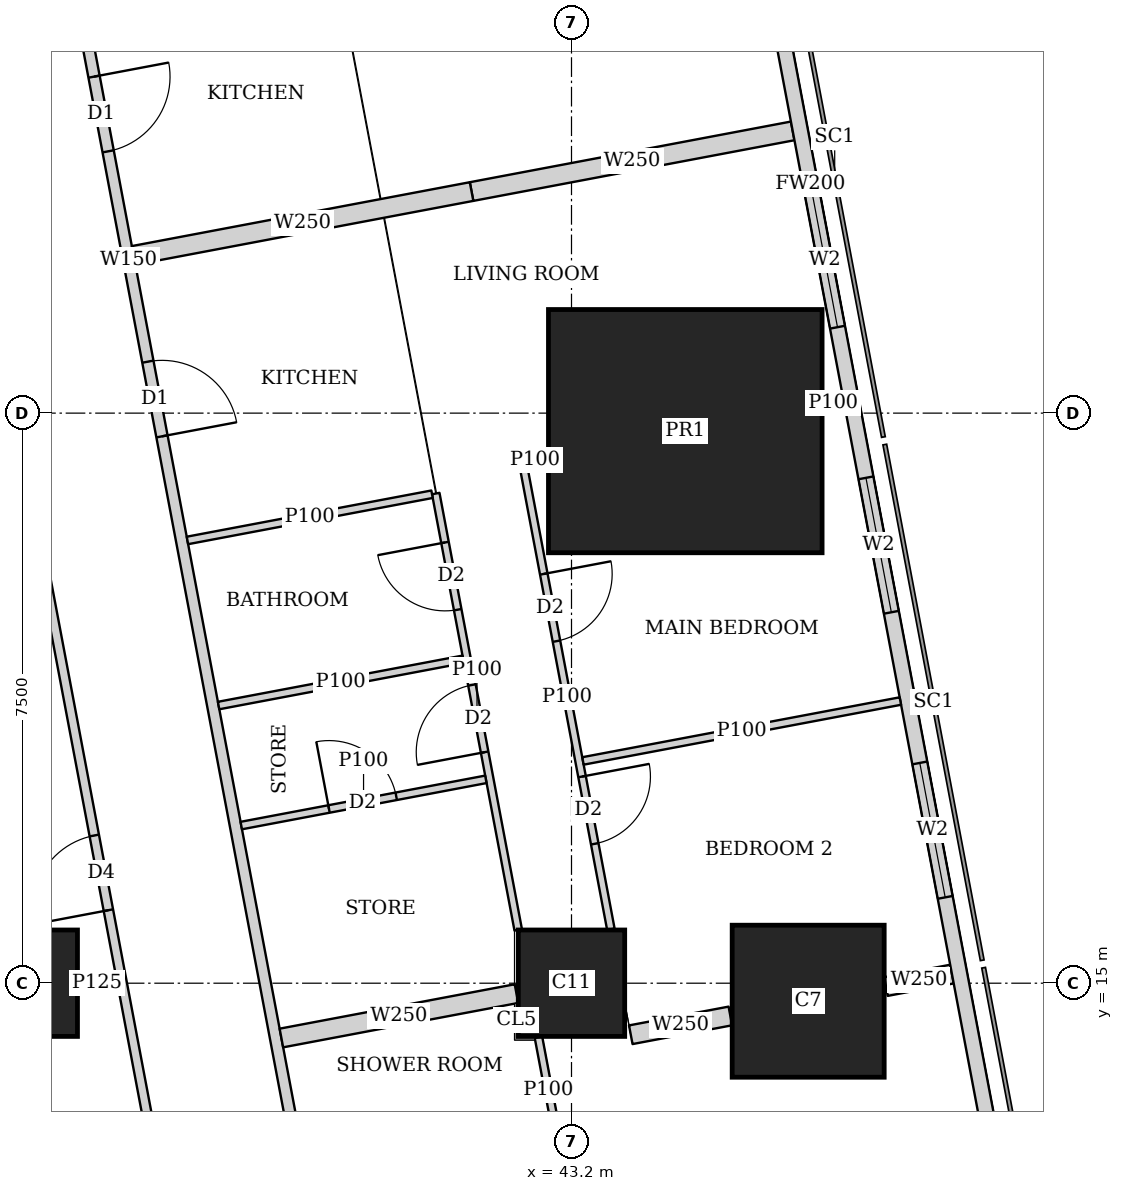
"""IFC4 building model, lengths in metres.
Left out: names, types, materials, properties, quantities, classifications, styles, units other than length and angle.
Written with IfcOpenShell. Run it as: python <this file> out.ifc"""

import sys

from ifc_helpers import new_model, si_unit, direction, frame, frame_2d, origin, origin_2d, place, context, subcontext, project, spatial, rectangle, extrude, element, fill, save


model = new_model("IFC4")
c1 = context("Model", 3, precision=1e-05, world=origin(), true_north=direction((0.0, 1.0)))
c2 = subcontext(c1, "Body", "Model", "MODEL_VIEW")
j1 = project(units=[si_unit("LENGTHUNIT", "METRE"), si_unit("PLANEANGLEUNIT", "RADIAN")], contexts=[c1])
p1 = place(None, origin())
s1 = spatial("IfcSite", under=j1, at=p1, CompositionType="ELEMENT")
p2 = place(p1, origin())
s2 = spatial("IfcBuilding", under=s1, at=p2, CompositionType="ELEMENT")
p3 = place(p2, frame((0.0, 0.0, 270.35)))
s3 = spatial("IfcBuildingStorey", under=s2, at=p3, CompositionType="ELEMENT", Elevation=270.35)
for number, where, z_axis, x_axis in (
    (1, (36.0, 15.0, 0.0), (0.0, 0.0, 1.0), (1.0, 0.0, 0.0)),
    (2, (43.2, 15.0, 0.0), (0.0, 0.0, 1.0), (1.0, 0.0, 0.0)),
):
    element("IfcColumn", number, at=place(p3, frame(where, z_axis=z_axis, x_axis=x_axis)), inside=s3, PredefinedType="COLUMN", context=c2, shape_type="SweptSolid", body=[
        extrude(rectangle(XDim=1.4, YDim=1.4, at=origin_2d()), origin(), (0.0, 0.0, 1.0), 3.75),
    ])
p4 = place(p3, frame((46.314, 14.763, 0.0), z_axis=(0.0, 0.0, 1.0), x_axis=(1.0, 0.0, 0.0)))
e3 = element("IfcColumn", 3, at=p4, inside=s3, PredefinedType="COLUMN", context=c2, shape_type="SweptSolid", body=[
    extrude(rectangle(XDim=2.0, YDim=2.0, at=origin_2d()), origin(), (0.0, 0.0, 1.0), 3.75),
])
p5 = place(p3, frame((44.697, 22.263, 0.0), z_axis=(0.0, 0.0, 1.0), x_axis=(1.0, 0.0, 0.0)))
e4 = element("IfcColumn", 4, at=p5, inside=s3, PredefinedType="COLUMN", context=c2, shape_type="SweptSolid", body=[
    extrude(rectangle(XDim=3.6, YDim=3.2, at=origin_2d()), origin(), (0.0, 0.0, 1.0), 3.75),
])
p6 = place(p3, frame((49.684, 7.832, 0.0), z_axis=(0.0, 0.0, 1.0), x_axis=(-0.185616669694, 0.982622232565, 0.0)))
e5 = element("IfcWall", 5, at=p6, inside=s3, PredefinedType="SOLIDWALL", context=c2, shape_type="SweptSolid", body=[
    extrude(rectangle(XDim=36.0, YDim=0.2, at=frame_2d((18.0, 0.0))), origin(), (0.0, 0.0, 1.0), 3.5),
])
p7 = place(p6, frame((2.518, 0.0, 0.9)))
e6 = element("IfcOpeningElement", 6, at=p7, cuts=e5, PredefinedType="OPENING", context=c2, shape_type="SweptSolid", body=[
    extrude(rectangle(XDim=2.4, YDim=1.5, at=frame_2d((1.2, 0.75))), frame((0.0, 0.11, 0.0), z_axis=(0.0, -1.0, 0.0), x_axis=(1.0, 0.0, 0.0)), (0.0, 0.0, 1.0), 0.22),
])
p8 = place(p6, frame((8.444, 0.0, 0.9)))
e7 = element("IfcOpeningElement", 7, at=p8, cuts=e5, PredefinedType="OPENING", context=c2, shape_type="SweptSolid", body=[
    extrude(rectangle(XDim=1.8, YDim=1.5, at=frame_2d((0.9, 0.75))), frame((0.0, 0.11, 0.0), z_axis=(0.0, -1.0, 0.0), x_axis=(1.0, 0.0, 0.0)), (0.0, 0.0, 1.0), 0.22),
])
p9 = place(p6, frame((12.261, 0.0, 0.9)))
e8 = element("IfcOpeningElement", 8, at=p9, cuts=e5, PredefinedType="OPENING", context=c2, shape_type="SweptSolid", body=[
    extrude(rectangle(XDim=1.8, YDim=1.5, at=frame_2d((0.9, 0.75))), frame((0.0, 0.11, 0.0), z_axis=(0.0, -1.0, 0.0), x_axis=(1.0, 0.0, 0.0)), (0.0, 0.0, 1.0), 0.22),
])
p10 = place(p6, frame((16.078, 0.0, 0.9)))
e9 = element("IfcOpeningElement", 9, at=p10, cuts=e5, PredefinedType="OPENING", context=c2, shape_type="SweptSolid", body=[
    extrude(rectangle(XDim=1.8, YDim=1.5, at=frame_2d((0.9, 0.75))), frame((0.0, 0.11, 0.0), z_axis=(0.0, -1.0, 0.0), x_axis=(1.0, 0.0, 0.0)), (0.0, 0.0, 1.0), 0.22),
])
p11 = place(p6, frame((19.894, 0.0, 0.9)))
e10 = element("IfcOpeningElement", 10, at=p11, cuts=e5, PredefinedType="OPENING", context=c2, shape_type="SweptSolid", body=[
    extrude(rectangle(XDim=1.8, YDim=1.5, at=frame_2d((0.9, 0.75))), frame((0.0, 0.11, 0.0), z_axis=(0.0, -1.0, 0.0), x_axis=(1.0, 0.0, 0.0)), (0.0, 0.0, 1.0), 0.22),
])
p12 = place(p6, frame((23.71, 0.0, 0.9)))
e11 = element("IfcOpeningElement", 11, at=p12, cuts=e5, PredefinedType="OPENING", context=c2, shape_type="SweptSolid", body=[
    extrude(rectangle(XDim=1.8, YDim=1.5, at=frame_2d((0.9, 0.75))), frame((0.0, 0.11, 0.0), z_axis=(0.0, -1.0, 0.0), x_axis=(1.0, 0.0, 0.0)), (0.0, 0.0, 1.0), 0.22),
])
p13 = place(p6, frame((27.526, 0.0, 0.9)))
e12 = element("IfcOpeningElement", 12, at=p13, cuts=e5, PredefinedType="OPENING", context=c2, shape_type="SweptSolid", body=[
    extrude(rectangle(XDim=1.8, YDim=1.5, at=frame_2d((0.9, 0.75))), frame((0.0, 0.11, 0.0), z_axis=(0.0, -1.0, 0.0), x_axis=(1.0, 0.0, 0.0)), (0.0, 0.0, 1.0), 0.22),
])
p14 = place(p6, frame((32.046, 0.0, 0.9)))
e13 = element("IfcOpeningElement", 13, at=p14, cuts=e5, PredefinedType="OPENING", context=c2, shape_type="SweptSolid", body=[
    extrude(rectangle(XDim=1.8, YDim=1.5, at=frame_2d((0.9, 0.75))), frame((0.0, 0.11, 0.0), z_axis=(0.0, -1.0, 0.0), x_axis=(1.0, 0.0, 0.0)), (0.0, 0.0, 1.0), 0.22),
])
p15 = place(p3, frame((34.036, 42.186, 0.0), z_axis=(0.0, 0.0, 1.0), x_axis=(0.185593518645, -0.9826266055, 0.0)))
e14 = element("IfcWall", 14, at=p15, inside=s3, PredefinedType="SOLIDWALL", context=c2, shape_type="SweptSolid", body=[
    extrude(rectangle(XDim=35.961, YDim=0.15, at=frame_2d((17.98, 0.0))), origin(), (0.0, 0.0, 1.0), 2.5),
])
p16 = place(p15, frame((15.529, 0.0, 0.0)))
e15 = element("IfcOpeningElement", 15, at=p16, cuts=e14, PredefinedType="OPENING", context=c2, shape_type="SweptSolid", body=[
    extrude(rectangle(XDim=1.0, YDim=2.1, at=frame_2d((0.5, 1.05))), frame((0.0, 0.085, 0.0), z_axis=(0.0, -1.0, 0.0), x_axis=(1.0, 0.0, 0.0)), (0.0, 0.0, 1.0), 0.17),
])
p17 = place(p15, frame((19.345, 0.0, 0.0)))
e16 = element("IfcOpeningElement", 16, at=p17, cuts=e14, PredefinedType="OPENING", context=c2, shape_type="SweptSolid", body=[
    extrude(rectangle(XDim=1.0, YDim=2.1, at=frame_2d((0.5, 1.05))), frame((0.0, 0.085, 0.0), z_axis=(0.0, -1.0, 0.0), x_axis=(1.0, 0.0, 0.0)), (0.0, 0.0, 1.0), 0.17),
])
p18 = place(p15, frame((30.594, 0.0, 0.0)))
e17 = element("IfcOpeningElement", 17, at=p18, cuts=e14, PredefinedType="OPENING", context=c2, shape_type="SweptSolid", body=[
    extrude(rectangle(XDim=1.0, YDim=2.1, at=frame_2d((0.5, 1.05))), frame((0.0, 0.085, 0.0), z_axis=(0.0, -1.0, 0.0), x_axis=(1.0, 0.0, 0.0)), (0.0, 0.0, 1.0), 0.17),
])
p19 = place(p3, frame((42.566, 21.809, 0.0), z_axis=(0.0, 0.0, 1.0), x_axis=(0.185613526435, -0.98262282632, 0.0)))
e18 = element("IfcWall", 18, at=p19, inside=s3, PredefinedType="PARTITIONING", context=c2, shape_type="SweptSolid", body=[
    extrude(rectangle(XDim=6.207, YDim=0.1, at=frame_2d((3.104, 0.0))), origin(), (0.0, 0.0, 1.0), 2.5),
])
p20 = place(p19, frame((1.45, 0.0, 0.0)))
e19 = element("IfcOpeningElement", 19, at=p20, cuts=e18, PredefinedType="OPENING", context=c2, shape_type="SweptSolid", body=[
    extrude(rectangle(XDim=0.9, YDim=2.1, at=frame_2d((0.45, 1.05))), frame((0.0, 0.06, 0.0), z_axis=(0.0, -1.0, 0.0), x_axis=(1.0, 0.0, 0.0)), (0.0, 0.0, 1.0), 0.12),
])
p21 = place(p19, frame((4.163, 0.0, 0.0)))
e20 = element("IfcOpeningElement", 20, at=p21, cuts=e18, PredefinedType="OPENING", context=c2, shape_type="SweptSolid", body=[
    extrude(rectangle(XDim=0.9, YDim=2.1, at=frame_2d((0.45, 1.05))), frame((0.0, 0.06, 0.0), z_axis=(0.0, -1.0, 0.0), x_axis=(1.0, 0.0, 0.0)), (0.0, 0.0, 1.0), 0.12),
])
p22 = place(p3, frame((41.414, 21.442, 0.0), z_axis=(0.0, 0.0, 1.0), x_axis=(0.185698675093, -0.982606738257, 0.0)))
e21 = element("IfcWall", 21, at=p22, inside=s3, PredefinedType="PARTITIONING", context=c2, shape_type="SweptSolid", body=[
    extrude(rectangle(XDim=5.843, YDim=0.1, at=frame_2d((2.921, 0.0))), origin(), (0.0, 0.0, 1.0), 3.5),
])
p23 = place(p22, frame((0.655, 0.0, 0.0)))
e22 = element("IfcOpeningElement", 22, at=p23, cuts=e21, PredefinedType="OPENING", context=c2, shape_type="SweptSolid", body=[
    extrude(rectangle(XDim=0.9, YDim=2.1, at=frame_2d((0.45, 1.05))), frame((0.0, 0.06, 0.0), z_axis=(0.0, -1.0, 0.0), x_axis=(1.0, 0.0, 0.0)), (0.0, 0.0, 1.0), 0.12),
])
p24 = place(p22, frame((2.563, 0.0, 0.0)))
e23 = element("IfcOpeningElement", 23, at=p24, cuts=e21, PredefinedType="OPENING", context=c2, shape_type="SweptSolid", body=[
    extrude(rectangle(XDim=0.9, YDim=2.1, at=frame_2d((0.45, 1.05))), frame((0.0, 0.06, 0.0), z_axis=(0.0, -1.0, 0.0), x_axis=(1.0, 0.0, 0.0)), (0.0, 0.0, 1.0), 0.12),
])
p25 = place(p3, frame((46.782, 22.657, 0.0), z_axis=(0.0, 0.0, 1.0), x_axis=(-0.982574553168, -0.185868898601, 0.0)))
e24 = element("IfcWall", 24, at=p25, inside=s3, PredefinedType="PARTITIONING", context=c2, shape_type="SweptSolid", body=[
    extrude(rectangle(XDim=0.28, YDim=0.1, at=frame_2d((0.14, 0.0))), origin(), (0.0, 0.0, 1.0), 3.5),
])
p26 = place(p3, frame((42.887, 21.921, 0.0), z_axis=(0.0, 0.0, 1.0), x_axis=(-0.982274918032, -0.187445953293, 0.0)))
e25 = element("IfcWall", 25, at=p26, inside=s3, PredefinedType="PARTITIONING", context=c2, shape_type="SweptSolid", body=[
    extrude(rectangle(XDim=0.336, YDim=0.1, at=frame_2d((0.168, 0.0))), origin(), (0.0, 0.0, 1.0), 2.5),
])
p27 = place(p3, frame((47.527, 18.712, 0.0), z_axis=(0.0, 0.0, 1.0), x_axis=(-0.982665405803, -0.185387972203, 0.0)))
e26 = element("IfcWall", 26, at=p27, inside=s3, PredefinedType="PARTITIONING", context=c2, shape_type="SweptSolid", body=[
    extrude(rectangle(XDim=4.25, YDim=0.1, at=frame_2d((2.125, 0.0))), origin(), (0.0, 0.0, 1.0), 2.5),
])
p28 = place(p3, frame((41.365, 21.433, 0.0), z_axis=(0.0, 0.0, 1.0), x_axis=(-0.982607026909, -0.185697147715, 0.0)))
e27 = element("IfcWall", 27, at=p28, inside=s3, PredefinedType="PARTITIONING", context=c2, shape_type="SweptSolid", body=[
    extrude(rectangle(XDim=3.275, YDim=0.1, at=frame_2d((1.637, 0.0))), origin(), (0.0, 0.0, 1.0), 3.5),
])
p29 = place(p3, frame((42.073, 17.682, 0.0), z_axis=(0.0, 0.0, 1.0), x_axis=(-0.982620626894, -0.185625169636, 0.0)))
e28 = element("IfcWall", 28, at=p29, inside=s3, PredefinedType="PARTITIONING", context=c2, shape_type="SweptSolid", body=[
    extrude(rectangle(XDim=3.275, YDim=0.1, at=frame_2d((1.637, 0.0))), origin(), (0.0, 0.0, 1.0), 3.5),
])
p30 = place(p29, frame((1.2, 0.0, 0.0)))
e29 = element("IfcOpeningElement", 29, at=p30, cuts=e28, PredefinedType="OPENING", context=c2, shape_type="SweptSolid", body=[
    extrude(rectangle(XDim=0.9, YDim=2.1, at=frame_2d((0.45, 1.05))), frame((0.0, 0.06, 0.0), z_axis=(0.0, -1.0, 0.0), x_axis=(1.0, 0.0, 0.0)), (0.0, 0.0, 1.0), 0.12),
])
p31 = place(p3, frame((41.775, 19.261, 0.0), z_axis=(0.0, 0.0, 1.0), x_axis=(-0.982620626894, -0.185625169636, 0.0)))
e30 = element("IfcWall", 30, at=p31, inside=s3, PredefinedType="PARTITIONING", context=c2, shape_type="SweptSolid", body=[
    extrude(rectangle(XDim=3.275, YDim=0.1, at=frame_2d((1.637, 0.0))), origin(), (0.0, 0.0, 1.0), 3.5),
])
p32 = place(p3, frame((46.11, 26.213, 0.0), z_axis=(0.0, 0.0, 1.0), x_axis=(-0.982633535512, -0.185556823879, 0.0)))
e31 = element("IfcWall", 31, at=p32, inside=s3, PredefinedType="SOLIDWALL", context=c2, shape_type="SweptSolid", body=[
    extrude(rectangle(XDim=4.3, YDim=0.25, at=frame_2d((2.15, 0.0))), origin(), (0.0, 0.0, 1.0), 2.5),
])
p33 = place(p3, frame((41.885, 25.415, 0.0), z_axis=(0.0, 0.0, 1.0), x_axis=(-0.982612837616, -0.185666398014, 0.0)))
e32 = element("IfcWall", 32, at=p33, inside=s3, PredefinedType="SOLIDWALL", context=c2, shape_type="SweptSolid", body=[
    extrude(rectangle(XDim=4.525, YDim=0.25, at=frame_2d((2.262, 0.0))), origin(), (0.0, 0.0, 1.0), 3.5),
])
p34 = place(p3, frame((42.765, 14.29, 0.0), z_axis=(0.0, 0.0, 1.0), x_axis=(0.185634589628, -0.982618847333, 0.0)))
e33 = element("IfcWall", 33, at=p34, inside=s3, PredefinedType="PARTITIONING", context=c2, shape_type="SweptSolid", body=[
    extrude(rectangle(XDim=1.413, YDim=0.1, at=frame_2d((0.706, 0.0))), origin(), (0.0, 0.0, 1.0), 3.5),
])
p35 = place(p3, frame((48.206, 15.12, 0.0), z_axis=(0.0, 0.0, 1.0), x_axis=(-0.982608419258, -0.185689780017, 0.0)))
e34 = element("IfcWall", 34, at=p35, inside=s3, PredefinedType="SOLIDWALL", context=c2, shape_type="SweptSolid", body=[
    extrude(rectangle(XDim=0.884, YDim=0.25, at=frame_2d((0.442, 0.0))), origin(), (0.0, 0.0, 1.0), 3.5),
])
p36 = place(p3, frame((45.29, 14.569, 0.0), z_axis=(0.0, 0.0, 1.0), x_axis=(-0.982676759201, -0.185327782391, 0.0)))
e35 = element("IfcWall", 35, at=p36, inside=s3, PredefinedType="SOLIDWALL", context=c2, shape_type="SweptSolid", body=[
    extrude(rectangle(XDim=1.333, YDim=0.25, at=frame_2d((0.667, 0.0))), origin(), (0.0, 0.0, 1.0), 3.5),
])
p37 = place(p3, frame((42.476, 14.863, 0.0), z_axis=(0.0, 0.0, 1.0), x_axis=(-0.982638716117, -0.185529387398, 0.0)))
e36 = element("IfcWall", 36, at=p37, inside=s3, PredefinedType="SOLIDWALL", context=c2, shape_type="SweptSolid", body=[
    extrude(rectangle(XDim=3.148, YDim=0.25, at=frame_2d((1.574, 0.0))), origin(), (0.0, 0.0, 1.0), 3.5),
])
p38 = place(p3, frame((38.202, 10.163, 0.0), z_axis=(0.0, 0.0, 1.0), x_axis=(-0.185610321132, 0.982623431783, 0.0)))
e37 = element("IfcWall", 37, at=p38, inside=s3, PredefinedType="PARTITIONING", context=c2, shape_type="SweptSolid", body=[
    extrude(rectangle(XDim=25.111, YDim=0.125, at=frame_2d((12.556, 0.0))), origin(), (0.0, 0.0, 1.0), 2.5),
])
p39 = place(p38, frame((0.708, 0.0, 0.0)))
e38 = element("IfcOpeningElement", 38, at=p39, cuts=e37, PredefinedType="OPENING", context=c2, shape_type="SweptSolid", body=[
    extrude(rectangle(XDim=1.0, YDim=2.1, at=frame_2d((0.5, 1.05))), frame((0.0, 0.073, 0.0), z_axis=(0.0, -1.0, 0.0), x_axis=(1.0, 0.0, 0.0)), (0.0, 0.0, 1.0), 0.145),
])
p40 = place(p38, frame((5.9, 0.0, 0.0)))
e39 = element("IfcOpeningElement", 39, at=p40, cuts=e37, PredefinedType="OPENING", context=c2, shape_type="SweptSolid", body=[
    extrude(rectangle(XDim=1.0, YDim=2.1, at=frame_2d((0.5, 1.05))), frame((0.0, 0.073, 0.0), z_axis=(0.0, -1.0, 0.0), x_axis=(1.0, 0.0, 0.0)), (0.0, 0.0, 1.0), 0.145),
])
p41 = place(p38, frame((13.378, 0.0, 0.0)))
e40 = element("IfcOpeningElement", 40, at=p41, cuts=e37, PredefinedType="OPENING", context=c2, shape_type="SweptSolid", body=[
    extrude(rectangle(XDim=1.0, YDim=2.1, at=frame_2d((0.5, 1.05))), frame((0.0, 0.073, 0.0), z_axis=(0.0, -1.0, 0.0), x_axis=(1.0, 0.0, 0.0)), (0.0, 0.0, 1.0), 0.145),
])
p42 = place(p38, frame((17.194, 0.0, 0.0)))
e41 = element("IfcOpeningElement", 41, at=p42, cuts=e37, PredefinedType="OPENING", context=c2, shape_type="SweptSolid", body=[
    extrude(rectangle(XDim=1.0, YDim=2.1, at=frame_2d((0.5, 1.05))), frame((0.0, 0.073, 0.0), z_axis=(0.0, -1.0, 0.0), x_axis=(1.0, 0.0, 0.0)), (0.0, 0.0, 1.0), 0.145),
])
p43 = place(p38, frame((21.15, 0.0, 0.0)))
e42 = element("IfcOpeningElement", 42, at=p43, cuts=e37, PredefinedType="OPENING", context=c2, shape_type="SweptSolid", body=[
    extrude(rectangle(XDim=1.0, YDim=2.1, at=frame_2d((0.5, 1.05))), frame((0.0, 0.073, 0.0), z_axis=(0.0, -1.0, 0.0), x_axis=(1.0, 0.0, 0.0)), (0.0, 0.0, 1.0), 0.145),
])
p44 = place(p3, frame((36.701, 15.0, 0.0), z_axis=(0.0, 0.0, 1.0), x_axis=(1.0, 0.0, 0.0)))
e43 = element("IfcWall", 43, at=p44, inside=s3, PredefinedType="PARTITIONING", context=c2, shape_type="SweptSolid", body=[
    extrude(rectangle(XDim=0.512, YDim=0.125, at=frame_2d((0.256, 0.0))), origin(), (0.0, 0.0, 1.0), 3.5),
])
p45 = place(p8, origin())
e44 = element("IfcWindow", 44, at=p45, inside=s3, PartitioningType="SINGLE_PANEL", PredefinedType="WINDOW", context=c2, shape_type="SweptSolid", body=[
    extrude(rectangle(XDim=1.8, YDim=1.5, at=frame_2d((0.9, 0.75))), frame((0.0, 0.03, 0.0), z_axis=(0.0, -1.0, 0.0), x_axis=(1.0, 0.0, 0.0)), (0.0, 0.0, 1.0), 0.06),
])
fill(e7, e44)
p46 = place(p9, origin())
e45 = element("IfcWindow", 45, at=p46, inside=s3, PartitioningType="SINGLE_PANEL", PredefinedType="WINDOW", context=c2, shape_type="SweptSolid", body=[
    extrude(rectangle(XDim=1.8, YDim=1.5, at=frame_2d((0.9, 0.75))), frame((0.0, 0.03, 0.0), z_axis=(0.0, -1.0, 0.0), x_axis=(1.0, 0.0, 0.0)), (0.0, 0.0, 1.0), 0.06),
])
fill(e8, e45)
p47 = place(p10, origin())
e46 = element("IfcWindow", 46, at=p47, inside=s3, PartitioningType="SINGLE_PANEL", PredefinedType="WINDOW", context=c2, shape_type="SweptSolid", body=[
    extrude(rectangle(XDim=1.8, YDim=1.5, at=frame_2d((0.9, 0.75))), frame((0.0, 0.03, 0.0), z_axis=(0.0, -1.0, 0.0), x_axis=(1.0, 0.0, 0.0)), (0.0, 0.0, 1.0), 0.06),
])
fill(e9, e46)
p48 = place(p16, origin())
e47 = element("IfcDoor", 47, at=p48, inside=s3, OperationType="SINGLE_SWING_LEFT", PredefinedType="DOOR", context=c2, shape_type="SweptSolid", body=[
    extrude(rectangle(XDim=1.0, YDim=2.1, at=frame_2d((0.5, 1.05))), frame((0.0, 0.025, 0.0), z_axis=(0.0, -1.0, 0.0), x_axis=(1.0, 0.0, 0.0)), (0.0, 0.0, 1.0), 0.05),
])
fill(e15, e47)
p49 = place(p20, origin())
e48 = element("IfcDoor", 48, at=p49, inside=s3, OperationType="SINGLE_SWING_LEFT", PredefinedType="DOOR", context=c2, shape_type="SweptSolid", body=[
    extrude(rectangle(XDim=0.9, YDim=2.1, at=frame_2d((0.45, 1.05))), frame((0.0, 0.025, 0.0), z_axis=(0.0, -1.0, 0.0), x_axis=(1.0, 0.0, 0.0)), (0.0, 0.0, 1.0), 0.05),
])
fill(e19, e48)
p50 = place(p21, origin())
e49 = element("IfcDoor", 49, at=p50, inside=s3, OperationType="SINGLE_SWING_LEFT", PredefinedType="DOOR", context=c2, shape_type="SweptSolid", body=[
    extrude(rectangle(XDim=0.9, YDim=2.1, at=frame_2d((0.45, 1.05))), frame((0.0, 0.025, 0.0), z_axis=(0.0, -1.0, 0.0), x_axis=(1.0, 0.0, 0.0)), (0.0, 0.0, 1.0), 0.05),
])
fill(e20, e49)
p51 = place(p23, origin())
e50 = element("IfcDoor", 50, at=p51, inside=s3, OperationType="SINGLE_SWING_RIGHT", PredefinedType="DOOR", context=c2, shape_type="SweptSolid", body=[
    extrude(rectangle(XDim=0.9, YDim=2.1, at=frame_2d((0.45, 1.05))), frame((0.0, 0.025, 0.0), z_axis=(0.0, -1.0, 0.0), x_axis=(1.0, 0.0, 0.0)), (0.0, 0.0, 1.0), 0.05),
])
fill(e22, e50)
p52 = place(p24, origin())
e51 = element("IfcDoor", 51, at=p52, inside=s3, OperationType="SINGLE_SWING_LEFT", PredefinedType="DOOR", context=c2, shape_type="SweptSolid", body=[
    extrude(rectangle(XDim=0.9, YDim=2.1, at=frame_2d((0.45, 1.05))), frame((0.0, 0.025, 0.0), z_axis=(0.0, -1.0, 0.0), x_axis=(1.0, 0.0, 0.0)), (0.0, 0.0, 1.0), 0.05),
])
fill(e23, e51)
p53 = place(p17, origin())
e52 = element("IfcDoor", 52, at=p53, inside=s3, OperationType="SINGLE_SWING_RIGHT", PredefinedType="DOOR", context=c2, shape_type="SweptSolid", body=[
    extrude(rectangle(XDim=1.0, YDim=2.1, at=frame_2d((0.5, 1.05))), frame((0.0, 0.025, 0.0), z_axis=(0.0, -1.0, 0.0), x_axis=(1.0, 0.0, 0.0)), (0.0, 0.0, 1.0), 0.05),
])
fill(e16, e52)
p54 = place(p30, origin())
e53 = element("IfcDoor", 53, at=p54, inside=s3, OperationType="SINGLE_SWING_LEFT", PredefinedType="DOOR", context=c2, shape_type="SweptSolid", body=[
    extrude(rectangle(XDim=0.9, YDim=2.1, at=frame_2d((0.45, 1.05))), frame((0.0, 0.025, 0.0), z_axis=(0.0, -1.0, 0.0), x_axis=(1.0, 0.0, 0.0)), (0.0, 0.0, 1.0), 0.05),
])
fill(e29, e53)
p55 = place(p40, origin())
e54 = element("IfcDoor", 54, at=p55, inside=s3, OperationType="SINGLE_SWING_LEFT", PredefinedType="DOOR", context=c2, shape_type="SweptSolid", body=[
    extrude(rectangle(XDim=1.0, YDim=2.1, at=frame_2d((0.5, 1.05))), frame((0.0, 0.025, 0.0), z_axis=(0.0, -1.0, 0.0), x_axis=(1.0, 0.0, 0.0)), (0.0, 0.0, 1.0), 0.05),
])
fill(e39, e54)
save(model, sys.argv[1])
